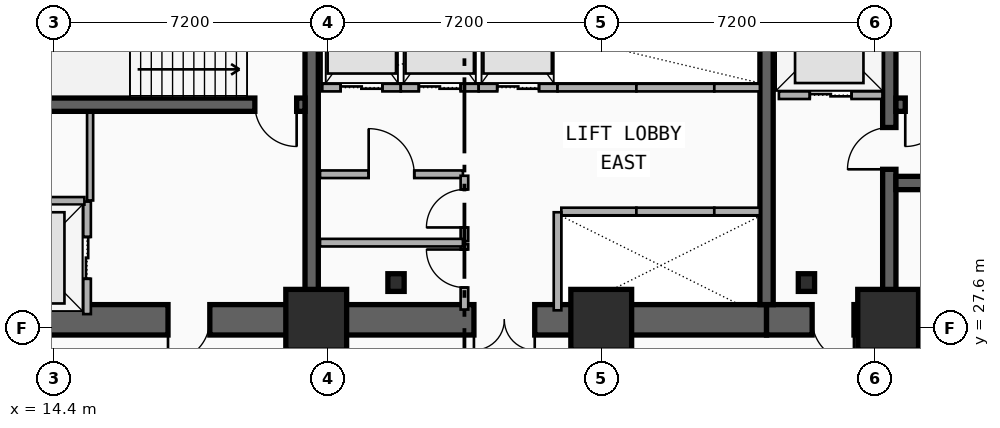
"""IFC4 building model, lengths in metres.
Left out: names, types, materials, properties, quantities, classifications, styles, units other than length and angle.
Written with IfcOpenShell. Run it as: python <this file> out.ifc"""

import sys

from ifc_helpers import new_model, si_unit, direction, frame, frame_2d, origin, origin_2d, place, context, subcontext, project, spatial, rectangle, i_section, extrude, element, fill, save


model = new_model("IFC4")
c1 = context("Model", 3, precision=1e-05, world=origin(), true_north=direction((0.0, 1.0)))
c2 = subcontext(c1, "Body", "Model", "MODEL_VIEW")
j1 = project(units=[si_unit("LENGTHUNIT", "METRE"), si_unit("PLANEANGLEUNIT", "RADIAN")], contexts=[c1])
p1 = place(None, origin())
s1 = spatial("IfcSite", under=j1, at=p1, CompositionType="ELEMENT")
p2 = place(p1, origin())
s2 = spatial("IfcBuilding", under=s1, at=p2, CompositionType="ELEMENT")
p3 = place(p2, frame((0.0, 0.0, 14.9)))
s3 = spatial("IfcBuildingStorey", under=s2, at=p3, CompositionType="ELEMENT", Elevation=14.9)
p4 = place(p3, frame((21.18, 27.82, 0.0), z_axis=(0.0, 0.0, 1.0), x_axis=(-1.0, 0.0, 0.0)))
e1 = element("IfcWall", 1, at=p4, inside=s3, PredefinedType="SHEAR", context=c2, shape_type="SweptSolid", body=[
    extrude(rectangle(XDim=9.03, YDim=0.8, at=frame_2d((4.515, 0.0))), origin(), (0.0, 0.0, 1.0), 4.5),
])
p5 = place(p4, frame((2.68, 0.0, 0.0)))
e2 = element("IfcOpeningElement", 2, at=p5, cuts=e1, PredefinedType="OPENING", context=c2, shape_type="SweptSolid", body=[
    extrude(rectangle(XDim=1.1, YDim=2.15, at=frame_2d((0.55, 1.075))), frame((0.0, 0.41, 0.0), z_axis=(0.0, -1.0, 0.0), x_axis=(1.0, 0.0, 0.0)), (0.0, 0.0, 1.0), 0.82),
])
p6 = place(p3, frame((33.15, 27.82, 0.0), z_axis=(0.0, 0.0, 1.0), x_axis=(-1.0, 0.0, 0.0)))
e3 = element("IfcWall", 3, at=p6, inside=s3, PredefinedType="SHEAR", context=c2, shape_type="SweptSolid", body=[
    extrude(rectangle(XDim=11.97, YDim=0.8, at=frame_2d((5.985, 0.0))), origin(), (0.0, 0.0, 1.0), 4.5),
])
p7 = place(p6, frame((6.1, 0.0, 0.0)))
e4 = element("IfcOpeningElement", 4, at=p7, cuts=e3, PredefinedType="OPENING", context=c2, shape_type="SweptSolid", body=[
    extrude(rectangle(XDim=1.6, YDim=2.2, at=frame_2d((0.8, 1.1))), frame((0.0, 0.41, 0.0), z_axis=(0.0, -1.0, 0.0), x_axis=(1.0, 0.0, 0.0)), (0.0, 0.0, 1.0), 0.82),
])
p8 = place(p3, frame((45.38, 27.82, 0.0), z_axis=(0.0, 0.0, 1.0), x_axis=(-1.0, 0.0, 0.0)))
e5 = element("IfcWall", 5, at=p8, inside=s3, PredefinedType="SHEAR", context=c2, shape_type="SweptSolid", body=[
    extrude(rectangle(XDim=12.23, YDim=0.8, at=frame_2d((6.115, 0.0))), origin(), (0.0, 0.0, 1.0), 4.5),
])
p9 = place(p8, frame((9.93, 0.0, 0.0)))
e6 = element("IfcOpeningElement", 6, at=p9, cuts=e5, PredefinedType="OPENING", context=c2, shape_type="SweptSolid", body=[
    extrude(rectangle(XDim=1.1, YDim=2.15, at=frame_2d((0.55, 1.075))), frame((0.0, 0.41, 0.0), z_axis=(0.0, -1.0, 0.0), x_axis=(1.0, 0.0, 0.0)), (0.0, 0.0, 1.0), 0.82),
])
p10 = place(p8, frame((6.23, 0.0, 0.0)))
e7 = element("IfcOpeningElement", 7, at=p10, cuts=e5, PredefinedType="OPENING", context=c2, shape_type="SweptSolid", body=[
    extrude(rectangle(XDim=1.1, YDim=2.15, at=frame_2d((0.55, 1.075))), frame((0.0, 0.41, 0.0), z_axis=(0.0, -1.0, 0.0), x_axis=(1.0, 0.0, 0.0)), (0.0, 0.0, 1.0), 0.82),
])
for number, where, z_axis, x_axis in (
    (8, (21.18, 28.22, 0.0), (0.0, 0.0, 1.0), (0.0, 1.0, 0.0)),
    (9, (33.15, 28.22, 0.0), (0.0, 0.0, 1.0), (0.0, 1.0, 0.0)),
):
    element("IfcWall", number, at=place(p3, frame(where, z_axis=z_axis, x_axis=x_axis)), inside=s3, PredefinedType="SHEAR", context=c2, shape_type="SweptSolid", body=[
        extrude(rectangle(XDim=8.43, YDim=0.35, at=frame_2d((4.215, 0.0))), origin(), (0.0, 0.0, 1.0), 4.5),
    ])
p11 = place(p3, frame((36.38, 28.22, 0.0), z_axis=(0.0, 0.0, 1.0), x_axis=(0.0, 1.0, 0.0)))
e10 = element("IfcWall", 10, at=p11, inside=s3, PredefinedType="SHEAR", context=c2, shape_type="SweptSolid", body=[
    extrude(rectangle(XDim=8.43, YDim=0.35, at=frame_2d((4.215, 0.0))), origin(), (0.0, 0.0, 1.0), 4.5),
])
p12 = place(p11, frame((3.56, 0.0, 0.0)))
e11 = element("IfcOpeningElement", 11, at=p12, cuts=e10, PredefinedType="OPENING", context=c2, shape_type="SweptSolid", body=[
    extrude(rectangle(XDim=1.1, YDim=2.15, at=frame_2d((0.55, 1.075))), frame((0.0, 0.185, 0.0), z_axis=(0.0, -1.0, 0.0), x_axis=(1.0, 0.0, 0.0)), (0.0, 0.0, 1.0), 0.37),
])
p13 = place(p3, frame((21.005, 33.48, 0.0), z_axis=(0.0, 0.0, 1.0), x_axis=(-1.0, 0.0, 0.0)))
e12 = element("IfcWall", 12, at=p13, inside=s3, PredefinedType="SHEAR", context=c2, shape_type="SweptSolid", body=[
    extrude(rectangle(XDim=8.455, YDim=0.35, at=frame_2d((4.228, 0.0))), origin(), (0.0, 0.0, 1.0), 4.5),
])
p14 = place(p13, frame((0.22, 0.0, 0.0)))
e13 = element("IfcOpeningElement", 13, at=p14, cuts=e12, PredefinedType="OPENING", context=c2, shape_type="SweptSolid", body=[
    extrude(rectangle(XDim=1.1, YDim=2.15, at=frame_2d((0.55, 1.075))), frame((0.0, 0.185, 0.0), z_axis=(0.0, -1.0, 0.0), x_axis=(1.0, 0.0, 0.0)), (0.0, 0.0, 1.0), 0.37),
])
p15 = place(p3, frame((44.98, 33.48, 0.0), z_axis=(0.0, 0.0, 1.0), x_axis=(-1.0, 0.0, 0.0)))
e14 = element("IfcWall", 14, at=p15, inside=s3, PredefinedType="SHEAR", context=c2, shape_type="SweptSolid", body=[
    extrude(rectangle(XDim=8.425, YDim=0.35, at=frame_2d((4.212, 0.0))), origin(), (0.0, 0.0, 1.0), 4.5),
])
p16 = place(p15, frame((7.08, 0.0, 0.0)))
e15 = element("IfcOpeningElement", 15, at=p16, cuts=e14, PredefinedType="OPENING", context=c2, shape_type="SweptSolid", body=[
    extrude(rectangle(XDim=1.1, YDim=2.15, at=frame_2d((0.55, 1.075))), frame((0.0, 0.185, 0.0), z_axis=(0.0, -1.0, 0.0), x_axis=(1.0, 0.0, 0.0)), (0.0, 0.0, 1.0), 0.37),
])
p17 = place(p3, frame((36.555, 31.42, 0.0), z_axis=(0.0, 0.0, 1.0), x_axis=(1.0, 0.0, 0.0)))
e16 = element("IfcWall", 16, at=p17, inside=s3, PredefinedType="SHEAR", context=c2, shape_type="SweptSolid", body=[
    extrude(rectangle(XDim=8.425, YDim=0.35, at=frame_2d((4.212, 0.0))), origin(), (0.0, 0.0, 1.0), 4.5),
])
for number, where, z_axis, x_axis in (
    (17, (23.4, 28.8, 0.0), (0.0, 0.0, 1.0), (1.0, 0.0, 0.0)),
    (18, (34.2, 28.8, 0.0), (0.0, 0.0, 1.0), (1.0, 0.0, 0.0)),
):
    element("IfcColumn", number, at=place(p3, frame(where, z_axis=z_axis, x_axis=x_axis)), inside=s3, PredefinedType="COLUMN", context=c2, shape_type="SweptSolid", body=[
        extrude(i_section(OverallWidth=0.428, OverallDepth=0.465, WebThickness=0.045, FlangeThickness=0.073, FilletRadius=0.015, at=origin_2d()), origin(), (0.0, 0.0, 1.0), 4.5),
    ])
for number, where, z_axis, x_axis in (
    (19, (21.3, 27.82, 0.0), (0.0, 0.0, 1.0), (1.0, 0.0, 0.0)),
    (20, (28.8, 27.82, 0.0), (0.0, 0.0, 1.0), (1.0, 0.0, 0.0)),
    (21, (36.35, 27.82, 0.0), (0.0, 0.0, 1.0), (1.0, 0.0, 0.0)),
):
    element("IfcColumn", number, at=place(p3, frame(where, z_axis=z_axis, x_axis=x_axis)), inside=s3, PredefinedType="COLUMN", context=c2, shape_type="SweptSolid", body=[
        extrude(rectangle(XDim=1.6, YDim=1.6, at=origin_2d()), origin(), (0.0, 0.0, 1.0), 4.5),
    ])
p18 = place(p3, frame((15.27, 27.97, 0.0), z_axis=(0.0, 0.0, 1.0), x_axis=(0.0, 1.0, 0.0)))
e22 = element("IfcWall", 22, at=p18, inside=s3, PredefinedType="PARTITIONING", context=c2, shape_type="SweptSolid", body=[
    extrude(rectangle(XDim=2.96, YDim=0.2, at=frame_2d((1.48, 0.0))), origin(), (0.0, 0.0, 1.0), 3.172),
])
p19 = place(p18, frame((0.93, 0.0, 0.0)))
e23 = element("IfcOpeningElement", 23, at=p19, cuts=e22, PredefinedType="OPENING", context=c2, shape_type="SweptSolid", body=[
    extrude(rectangle(XDim=1.1, YDim=2.15, at=frame_2d((0.55, 1.075))), frame((0.0, 0.11, 0.0), z_axis=(0.0, -1.0, 0.0), x_axis=(1.0, 0.0, 0.0)), (0.0, 0.0, 1.0), 0.22),
])
p20 = place(p3, frame((12.45, 30.95, 0.0), z_axis=(0.0, 0.0, 1.0), x_axis=(1.0, 0.0, 0.0)))
e24 = element("IfcWall", 24, at=p20, inside=s3, PredefinedType="PARTITIONING", context=c2, shape_type="SweptSolid", body=[
    extrude(rectangle(XDim=2.75, YDim=0.2, at=frame_2d((1.375, 0.0))), origin(), (0.0, 0.0, 1.0), 3.172),
])
p21 = place(p3, frame((33.475, 33.73, 0.0), z_axis=(0.0, 0.0, 1.0), x_axis=(1.0, 0.0, 0.0)))
e25 = element("IfcWall", 25, at=p21, inside=s3, PredefinedType="PARTITIONING", context=c2, shape_type="SweptSolid", body=[
    extrude(rectangle(XDim=2.725, YDim=0.2, at=frame_2d((1.362, 0.0))), origin(), (0.0, 0.0, 1.0), 3.172),
])
p22 = place(p21, frame((0.812, 0.0, 0.0)))
e26 = element("IfcOpeningElement", 26, at=p22, cuts=e25, PredefinedType="OPENING", context=c2, shape_type="SweptSolid", body=[
    extrude(rectangle(XDim=1.1, YDim=2.15, at=frame_2d((0.55, 1.075))), frame((0.0, 0.11, 0.0), z_axis=(0.0, -1.0, 0.0), x_axis=(1.0, 0.0, 0.0)), (0.0, 0.0, 1.0), 0.22),
])
p23 = place(p3, frame((27.75, 30.67, 0.0), z_axis=(0.0, 0.0, 1.0), x_axis=(1.0, 0.0, 0.0)))
e27 = element("IfcWall", 27, at=p23, inside=s3, PredefinedType="PARTITIONING", context=c2, shape_type="SweptSolid", body=[
    extrude(rectangle(XDim=1.975, YDim=0.2, at=frame_2d((0.988, 0.0))), origin(), (0.0, 0.0, 1.0), 3.172),
])
p24 = place(p3, frame((27.65, 28.07, 0.0), z_axis=(0.0, 0.0, 1.0), x_axis=(0.0, 1.0, 0.0)))
e28 = element("IfcWall", 28, at=p24, inside=s3, PredefinedType="PARTITIONING", context=c2, shape_type="SweptSolid", body=[
    extrude(rectangle(XDim=2.58, YDim=0.2, at=frame_2d((1.29, 0.0))), origin(), (0.0, 0.0, 1.0), 3.172),
])
p25 = place(p3, frame((29.725, 30.67, 0.0), z_axis=(0.0, 0.0, 1.0), x_axis=(1.0, 0.0, 0.0)))
e29 = element("IfcWall", 29, at=p25, inside=s3, PredefinedType="PARTITIONING", context=c2, shape_type="SweptSolid", body=[
    extrude(rectangle(XDim=2.05, YDim=0.2, at=frame_2d((1.025, 0.0))), origin(), (0.0, 0.0, 1.0), 4.2),
])
p26 = place(p3, frame((31.775, 30.67, 0.0), z_axis=(0.0, 0.0, 1.0), x_axis=(1.0, 0.0, 0.0)))
e30 = element("IfcWall", 30, at=p26, inside=s3, PredefinedType="PARTITIONING", context=c2, shape_type="SweptSolid", body=[
    extrude(rectangle(XDim=1.2, YDim=0.2, at=frame_2d((0.6, 0.0))), origin(), (0.0, 0.0, 1.0), 4.2),
])
p27 = place(p3, frame((21.46, 33.93, 0.0), z_axis=(0.0, 0.0, 1.0), x_axis=(1.0, 0.0, 0.0)))
e31 = element("IfcWall", 31, at=p27, inside=s3, PredefinedType="PARTITIONING", context=c2, shape_type="SweptSolid", body=[
    extrude(rectangle(XDim=2.065, YDim=0.2, at=frame_2d((1.032, 0.0))), origin(), (0.0, 0.0, 1.0), 3.172),
])
p28 = place(p27, frame((0.482, 0.0, 0.0)))
e32 = element("IfcOpeningElement", 32, at=p28, cuts=e31, PredefinedType="OPENING", context=c2, shape_type="SweptSolid", body=[
    extrude(rectangle(XDim=1.1, YDim=2.15, at=frame_2d((0.55, 1.075))), frame((0.0, 0.11, 0.0), z_axis=(0.0, -1.0, 0.0), x_axis=(1.0, 0.0, 0.0)), (0.0, 0.0, 1.0), 0.22),
])
p29 = place(p3, frame((23.525, 33.93, 0.0), z_axis=(0.0, 0.0, 1.0), x_axis=(1.0, 0.0, 0.0)))
e33 = element("IfcWall", 33, at=p29, inside=s3, PredefinedType="PARTITIONING", context=c2, shape_type="SweptSolid", body=[
    extrude(rectangle(XDim=2.05, YDim=0.2, at=frame_2d((1.025, 0.0))), origin(), (0.0, 0.0, 1.0), 4.2),
])
p30 = place(p29, frame((0.475, 0.0, 0.0)))
e34 = element("IfcOpeningElement", 34, at=p30, cuts=e33, PredefinedType="OPENING", context=c2, shape_type="SweptSolid", body=[
    extrude(rectangle(XDim=1.1, YDim=2.15, at=frame_2d((0.55, 1.075))), frame((0.0, 0.11, 0.0), z_axis=(0.0, -1.0, 0.0), x_axis=(1.0, 0.0, 0.0)), (0.0, 0.0, 1.0), 0.22),
])
p31 = place(p3, frame((25.575, 33.93, 0.0), z_axis=(0.0, 0.0, 1.0), x_axis=(1.0, 0.0, 0.0)))
e35 = element("IfcWall", 35, at=p31, inside=s3, PredefinedType="PARTITIONING", context=c2, shape_type="SweptSolid", body=[
    extrude(rectangle(XDim=2.075, YDim=0.2, at=frame_2d((1.038, 0.0))), origin(), (0.0, 0.0, 1.0), 4.2),
])
p32 = place(p31, frame((0.488, 0.0, 0.0)))
e36 = element("IfcOpeningElement", 36, at=p32, cuts=e35, PredefinedType="OPENING", context=c2, shape_type="SweptSolid", body=[
    extrude(rectangle(XDim=1.1, YDim=2.15, at=frame_2d((0.55, 1.075))), frame((0.0, 0.11, 0.0), z_axis=(0.0, -1.0, 0.0), x_axis=(1.0, 0.0, 0.0)), (0.0, 0.0, 1.0), 0.22),
])
p33 = place(p3, frame((27.65, 33.93, 0.0), z_axis=(0.0, 0.0, 1.0), x_axis=(1.0, 0.0, 0.0)))
e37 = element("IfcWall", 37, at=p33, inside=s3, PredefinedType="PARTITIONING", context=c2, shape_type="SweptSolid", body=[
    extrude(rectangle(XDim=2.075, YDim=0.2, at=frame_2d((1.038, 0.0))), origin(), (0.0, 0.0, 1.0), 3.172),
])
p34 = place(p3, frame((29.725, 33.93, 0.0), z_axis=(0.0, 0.0, 1.0), x_axis=(1.0, 0.0, 0.0)))
e38 = element("IfcWall", 38, at=p34, inside=s3, PredefinedType="PARTITIONING", context=c2, shape_type="SweptSolid", body=[
    extrude(rectangle(XDim=2.05, YDim=0.2, at=frame_2d((1.025, 0.0))), origin(), (0.0, 0.0, 1.0), 4.2),
])
p35 = place(p3, frame((31.775, 33.93, 0.0), z_axis=(0.0, 0.0, 1.0), x_axis=(1.0, 0.0, 0.0)))
e39 = element("IfcWall", 39, at=p35, inside=s3, PredefinedType="PARTITIONING", context=c2, shape_type="SweptSolid", body=[
    extrude(rectangle(XDim=1.2, YDim=0.2, at=frame_2d((0.6, 0.0))), origin(), (0.0, 0.0, 1.0), 4.2),
])
p36 = place(p3, frame((21.4, 31.65, 0.0), z_axis=(0.0, 0.0, 1.0), x_axis=(1.0, 0.0, 0.0)))
e40 = element("IfcWall", 40, at=p36, inside=s3, PredefinedType="PARTITIONING", context=c2, shape_type="SweptSolid", body=[
    extrude(rectangle(XDim=3.76, YDim=0.2, at=frame_2d((1.88, 0.0))), origin(), (0.0, 0.0, 1.0), 3.172),
])
p37 = place(p36, frame((1.28, 0.0, 0.0)))
e41 = element("IfcOpeningElement", 41, at=p37, cuts=e40, PredefinedType="OPENING", context=c2, shape_type="SweptSolid", body=[
    extrude(rectangle(XDim=1.2, YDim=2.15, at=frame_2d((0.6, 1.075))), frame((0.0, 0.11, 0.0), z_axis=(0.0, -1.0, 0.0), x_axis=(1.0, 0.0, 0.0)), (0.0, 0.0, 1.0), 0.22),
])
p38 = place(p3, frame((25.2, 28.09, 0.0), z_axis=(0.0, 0.0, 1.0), x_axis=(0.0, 1.0, 0.0)))
e42 = element("IfcWall", 42, at=p38, inside=s3, PredefinedType="PARTITIONING", context=c2, shape_type="SweptSolid", body=[
    extrude(rectangle(XDim=1.72, YDim=0.2, at=frame_2d((0.86, 0.0))), origin(), (0.0, 0.0, 1.0), 4.2),
])
p39 = place(p38, frame((0.58, 0.0, 0.0)))
e43 = element("IfcOpeningElement", 43, at=p39, cuts=e42, PredefinedType="OPENING", context=c2, shape_type="SweptSolid", body=[
    extrude(rectangle(XDim=1.0, YDim=2.15, at=frame_2d((0.5, 1.075))), frame((0.0, 0.11, 0.0), z_axis=(0.0, -1.0, 0.0), x_axis=(1.0, 0.0, 0.0)), (0.0, 0.0, 1.0), 0.22),
])
p40 = place(p3, frame((25.2, 29.89, 0.0), z_axis=(0.0, 0.0, 1.0), x_axis=(0.0, 1.0, 0.0)))
e44 = element("IfcWall", 44, at=p40, inside=s3, PredefinedType="PARTITIONING", context=c2, shape_type="SweptSolid", body=[
    extrude(rectangle(XDim=1.72, YDim=0.2, at=frame_2d((0.86, 0.0))), origin(), (0.0, 0.0, 1.0), 4.2),
])
p41 = place(p40, frame((0.36, 0.0, 0.0)))
e45 = element("IfcOpeningElement", 45, at=p41, cuts=e44, PredefinedType="OPENING", context=c2, shape_type="SweptSolid", body=[
    extrude(rectangle(XDim=1.0, YDim=2.15, at=frame_2d((0.5, 1.075))), frame((0.0, 0.11, 0.0), z_axis=(0.0, -1.0, 0.0), x_axis=(1.0, 0.0, 0.0)), (0.0, 0.0, 1.0), 0.22),
])
p42 = place(p3, frame((21.4, 29.85, 0.0), z_axis=(0.0, 0.0, 1.0), x_axis=(1.0, 0.0, 0.0)))
e46 = element("IfcWall", 46, at=p42, inside=s3, PredefinedType="PARTITIONING", context=c2, shape_type="SweptSolid", body=[
    extrude(rectangle(XDim=3.76, YDim=0.2, at=frame_2d((1.88, 0.0))), origin(), (0.0, 0.0, 1.0), 3.172),
])
p43 = place(p3, frame((15.35, 30.96, 0.0), z_axis=(0.0, 0.0, 1.0), x_axis=(0.0, 1.0, 0.0)))
e47 = element("IfcWall", 47, at=p43, inside=s3, PredefinedType="PARTITIONING", context=c2, shape_type="SweptSolid", body=[
    extrude(rectangle(XDim=2.31, YDim=0.16, at=frame_2d((1.155, 0.0))), origin(), (0.0, 0.0, 1.0), 4.2),
])
p44 = place(p19, origin())
e48 = element("IfcDoor", 48, at=p44, inside=s3, OperationType="DOUBLE_DOOR_SLIDING", PredefinedType="DOOR", context=c2, shape_type="SweptSolid", body=[
    extrude(rectangle(XDim=1.1, YDim=2.15, at=frame_2d((0.55, 1.075))), frame((0.0, 0.025, 0.0), z_axis=(0.0, -1.0, 0.0), x_axis=(1.0, 0.0, 0.0)), (0.0, 0.0, 1.0), 0.05),
])
fill(e23, e48)
p45 = place(p22, origin())
e49 = element("IfcDoor", 49, at=p45, inside=s3, OperationType="DOUBLE_DOOR_SLIDING", PredefinedType="DOOR", context=c2, shape_type="SweptSolid", body=[
    extrude(rectangle(XDim=1.1, YDim=2.15, at=frame_2d((0.55, 1.075))), frame((0.0, 0.025, 0.0), z_axis=(0.0, -1.0, 0.0), x_axis=(1.0, 0.0, 0.0)), (0.0, 0.0, 1.0), 0.05),
])
fill(e26, e49)
p46 = place(p28, origin())
e50 = element("IfcDoor", 50, at=p46, inside=s3, OperationType="DOUBLE_DOOR_SLIDING", PredefinedType="DOOR", context=c2, shape_type="SweptSolid", body=[
    extrude(rectangle(XDim=1.1, YDim=2.15, at=frame_2d((0.55, 1.075))), frame((0.0, 0.025, 0.0), z_axis=(0.0, -1.0, 0.0), x_axis=(1.0, 0.0, 0.0)), (0.0, 0.0, 1.0), 0.05),
])
fill(e32, e50)
p47 = place(p30, origin())
e51 = element("IfcDoor", 51, at=p47, inside=s3, OperationType="DOUBLE_DOOR_SLIDING", PredefinedType="DOOR", context=c2, shape_type="SweptSolid", body=[
    extrude(rectangle(XDim=1.1, YDim=2.15, at=frame_2d((0.55, 1.075))), frame((0.0, 0.025, 0.0), z_axis=(0.0, -1.0, 0.0), x_axis=(1.0, 0.0, 0.0)), (0.0, 0.0, 1.0), 0.05),
])
fill(e34, e51)
p48 = place(p32, origin())
e52 = element("IfcDoor", 52, at=p48, inside=s3, OperationType="DOUBLE_DOOR_SLIDING", PredefinedType="DOOR", context=c2, shape_type="SweptSolid", body=[
    extrude(rectangle(XDim=1.1, YDim=2.15, at=frame_2d((0.55, 1.075))), frame((0.0, 0.025, 0.0), z_axis=(0.0, -1.0, 0.0), x_axis=(1.0, 0.0, 0.0)), (0.0, 0.0, 1.0), 0.05),
])
fill(e36, e52)
p49 = place(p14, origin())
e53 = element("IfcDoor", 53, at=p49, inside=s3, OperationType="SINGLE_SWING_LEFT", PredefinedType="DOOR", context=c2, shape_type="SweptSolid", body=[
    extrude(rectangle(XDim=1.1, YDim=2.15, at=frame_2d((0.55, 1.075))), frame((0.0, 0.025, 0.0), z_axis=(0.0, -1.0, 0.0), x_axis=(1.0, 0.0, 0.0)), (0.0, 0.0, 1.0), 0.05),
])
fill(e13, e53)
p50 = place(p5, origin())
e54 = element("IfcDoor", 54, at=p50, inside=s3, OperationType="SINGLE_SWING_RIGHT", PredefinedType="DOOR", context=c2, shape_type="SweptSolid", body=[
    extrude(rectangle(XDim=1.1, YDim=2.15, at=frame_2d((0.55, 1.075))), frame((0.0, 0.025, 0.0), z_axis=(0.0, -1.0, 0.0), x_axis=(1.0, 0.0, 0.0)), (0.0, 0.0, 1.0), 0.05),
])
fill(e2, e54)
p51 = place(p16, origin())
e55 = element("IfcDoor", 55, at=p51, inside=s3, OperationType="SINGLE_SWING_RIGHT", PredefinedType="DOOR", context=c2, shape_type="SweptSolid", body=[
    extrude(rectangle(XDim=1.1, YDim=2.15, at=frame_2d((0.55, 1.075))), frame((0.0, 0.025, 0.0), z_axis=(0.0, -1.0, 0.0), x_axis=(1.0, 0.0, 0.0)), (0.0, 0.0, 1.0), 0.05),
])
fill(e15, e55)
p52 = place(p12, origin())
e56 = element("IfcDoor", 56, at=p52, inside=s3, OperationType="SINGLE_SWING_LEFT", PredefinedType="DOOR", context=c2, shape_type="SweptSolid", body=[
    extrude(rectangle(XDim=1.1, YDim=2.15, at=frame_2d((0.55, 1.075))), frame((0.0, 0.025, 0.0), z_axis=(0.0, -1.0, 0.0), x_axis=(1.0, 0.0, 0.0)), (0.0, 0.0, 1.0), 0.05),
])
fill(e11, e56)
p53 = place(p9, origin())
e57 = element("IfcDoor", 57, at=p53, inside=s3, OperationType="SINGLE_SWING_LEFT", PredefinedType="DOOR", context=c2, shape_type="SweptSolid", body=[
    extrude(rectangle(XDim=1.1, YDim=2.15, at=frame_2d((0.55, 1.075))), frame((0.0, 0.025, 0.0), z_axis=(0.0, -1.0, 0.0), x_axis=(1.0, 0.0, 0.0)), (0.0, 0.0, 1.0), 0.05),
])
fill(e6, e57)
p54 = place(p7, origin())
e58 = element("IfcDoor", 58, at=p54, inside=s3, OperationType="SINGLE_SWING_LEFT", PredefinedType="DOOR", context=c2, shape_type="SweptSolid", body=[
    extrude(rectangle(XDim=1.6, YDim=2.2, at=frame_2d((0.8, 1.1))), frame((0.0, 0.025, 0.0), z_axis=(0.0, -1.0, 0.0), x_axis=(1.0, 0.0, 0.0)), (0.0, 0.0, 1.0), 0.05),
])
fill(e4, e58)
p55 = place(p37, origin())
e59 = element("IfcDoor", 59, at=p55, inside=s3, OperationType="SINGLE_SWING_LEFT", PredefinedType="DOOR", context=c2, shape_type="SweptSolid", body=[
    extrude(rectangle(XDim=1.2, YDim=2.15, at=frame_2d((0.6, 1.075))), frame((0.0, 0.025, 0.0), z_axis=(0.0, -1.0, 0.0), x_axis=(1.0, 0.0, 0.0)), (0.0, 0.0, 1.0), 0.05),
])
fill(e41, e59)
p56 = place(p39, origin())
e60 = element("IfcDoor", 60, at=p56, inside=s3, OperationType="SINGLE_SWING_RIGHT", PredefinedType="DOOR", context=c2, shape_type="SweptSolid", body=[
    extrude(rectangle(XDim=1.0, YDim=2.15, at=frame_2d((0.5, 1.075))), frame((0.0, 0.025, 0.0), z_axis=(0.0, -1.0, 0.0), x_axis=(1.0, 0.0, 0.0)), (0.0, 0.0, 1.0), 0.05),
])
fill(e43, e60)
p57 = place(p41, origin())
e61 = element("IfcDoor", 61, at=p57, inside=s3, OperationType="SINGLE_SWING_LEFT", PredefinedType="DOOR", context=c2, shape_type="SweptSolid", body=[
    extrude(rectangle(XDim=1.0, YDim=2.15, at=frame_2d((0.5, 1.075))), frame((0.0, 0.025, 0.0), z_axis=(0.0, -1.0, 0.0), x_axis=(1.0, 0.0, 0.0)), (0.0, 0.0, 1.0), 0.05),
])
fill(e45, e61)
save(model, sys.argv[1])
